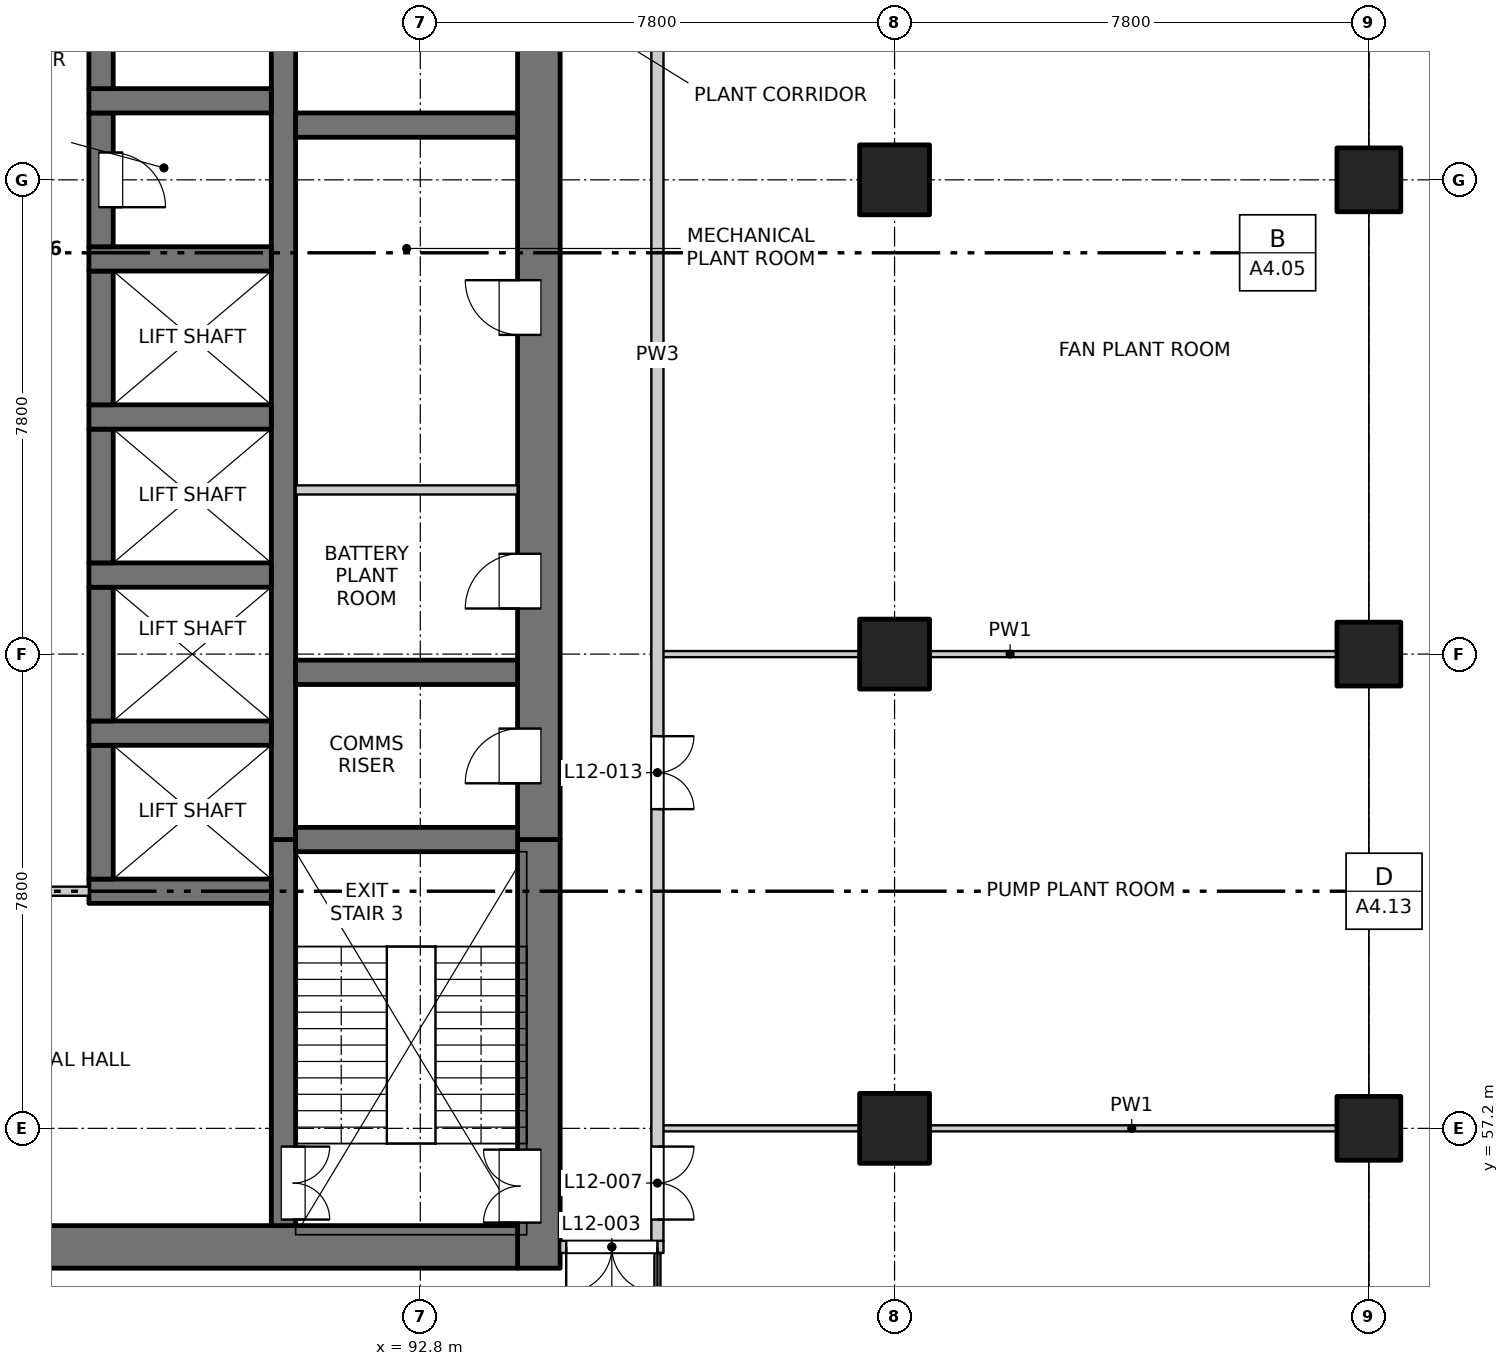
"""IFC4 building model, lengths in metres.
Left out: names, types, materials, properties, quantities, classifications, styles, units other than length and angle.
Written with IfcOpenShell. Run it as: python <this file> out.ifc"""

import sys

from ifc_helpers import new_model, si_unit, direction, frame, frame_2d, origin, origin_2d, place, context, subcontext, project, spatial, rectangle, extrude, element, fill, save


model = new_model("IFC4")
c1 = context("Model", 3, precision=1e-05, world=origin(), true_north=direction((0.0, 1.0)))
c2 = subcontext(c1, "Body", "Model", "MODEL_VIEW")
j1 = project(units=[si_unit("LENGTHUNIT", "METRE"), si_unit("PLANEANGLEUNIT", "RADIAN")], contexts=[c1])
p1 = place(None, origin())
s1 = spatial("IfcSite", under=j1, at=p1, CompositionType="ELEMENT")
p2 = place(p1, origin())
s2 = spatial("IfcBuilding", under=s1, at=p2, CompositionType="ELEMENT")
p3 = place(p2, frame((0.0, 0.0, 46.7)))
s3 = spatial("IfcBuildingStorey", under=s2, at=p3, CompositionType="ELEMENT", Elevation=46.7)
for number, where, z_axis, x_axis in (
    (1, (108.4, 57.2, -0.3), (0.0, 0.0, 1.0), (1.0, 0.0, 0.0)),
    (2, (108.4, 65.0, -0.3), (0.0, 0.0, 1.0), (1.0, 0.0, 0.0)),
    (3, (108.4, 72.8, -0.3), (0.0, 0.0, 1.0), (1.0, 0.0, 0.0)),
):
    element("IfcColumn", number, at=place(p3, frame(where, z_axis=z_axis, x_axis=x_axis)), inside=s3, PredefinedType="COLUMN", context=c2, shape_type="SweptSolid", body=[
        extrude(rectangle(XDim=1.05, YDim=1.05, at=origin_2d()), origin(), (0.0, 0.0, 1.0), 4.5),
    ])
for number, where, z_axis, x_axis in (
    (4, (100.6, 57.2, -0.3), (0.0, 0.0, 1.0), (1.0, 0.0, 0.0)),
    (5, (100.6, 65.0, -0.3), (0.0, 0.0, 1.0), (1.0, 0.0, 0.0)),
    (6, (100.6, 72.8, -0.3), (0.0, 0.0, 1.0), (1.0, 0.0, 0.0)),
):
    element("IfcColumn", number, at=place(p3, frame(where, z_axis=z_axis, x_axis=x_axis)), inside=s3, PredefinedType="COLUMN", context=c2, shape_type="SweptSolid", body=[
        extrude(rectangle(XDim=1.15, YDim=1.15, at=origin_2d()), origin(), (0.0, 0.0, 1.0), 4.5),
    ])
p4 = place(p3, frame((94.75, 54.9, -0.3), z_axis=(0.0, 0.0, 1.0), x_axis=(0.0, 1.0, 0.0)))
e7 = element("IfcWall", 7, at=p4, inside=s3, PredefinedType="SOLIDWALL", context=c2, shape_type="SweptSolid", body=[
    extrude(rectangle(XDim=7.05, YDim=0.7, at=frame_2d((3.525, 0.0))), origin(), (0.0, 0.0, 1.0), 4.5),
])
p5 = place(p4, frame((0.75, 0.0, 0.3)))
e8 = element("IfcOpeningElement", 8, at=p5, cuts=e7, PredefinedType="OPENING", context=c2, shape_type="SweptSolid", body=[
    extrude(rectangle(XDim=1.2, YDim=2.1, at=frame_2d((0.6, 1.05))), frame((0.0, 0.36, 0.0), z_axis=(0.0, -1.0, 0.0), x_axis=(1.0, 0.0, 0.0)), (0.0, 0.0, 1.0), 0.72),
])
p6 = place(p3, frame((94.75, 61.95, -0.3), z_axis=(0.0, 0.0, 1.0), x_axis=(0.0, 1.0, 0.0)))
e9 = element("IfcWall", 9, at=p6, inside=s3, PredefinedType="SOLIDWALL", context=c2, shape_type="SweptSolid", body=[
    extrude(rectangle(XDim=15.35, YDim=0.7, at=frame_2d((7.675, 0.0))), origin(), (0.0, 0.0, 1.0), 4.5),
])
p7 = place(p6, frame((0.925, 0.0, 0.3)))
e10 = element("IfcOpeningElement", 10, at=p7, cuts=e9, PredefinedType="OPENING", context=c2, shape_type="SweptSolid", body=[
    extrude(rectangle(XDim=0.9, YDim=2.1, at=frame_2d((0.45, 1.05))), frame((0.0, 0.36, 0.0), z_axis=(0.0, -1.0, 0.0), x_axis=(1.0, 0.0, 0.0)), (0.0, 0.0, 1.0), 0.72),
])
p8 = place(p6, frame((3.8, 0.0, 0.3)))
e11 = element("IfcOpeningElement", 11, at=p8, cuts=e9, PredefinedType="OPENING", context=c2, shape_type="SweptSolid", body=[
    extrude(rectangle(XDim=0.9, YDim=2.1, at=frame_2d((0.45, 1.05))), frame((0.0, 0.36, 0.0), z_axis=(0.0, -1.0, 0.0), x_axis=(1.0, 0.0, 0.0)), (0.0, 0.0, 1.0), 0.72),
])
p9 = place(p6, frame((8.3, 0.0, 0.3)))
e12 = element("IfcOpeningElement", 12, at=p9, cuts=e9, PredefinedType="OPENING", context=c2, shape_type="SweptSolid", body=[
    extrude(rectangle(XDim=0.9, YDim=2.1, at=frame_2d((0.45, 1.05))), frame((0.0, 0.36, 0.0), z_axis=(0.0, -1.0, 0.0), x_axis=(1.0, 0.0, 0.0)), (0.0, 0.0, 1.0), 0.72),
])
p10 = place(p6, frame((13.1, 0.0, 0.3)))
e13 = element("IfcOpeningElement", 13, at=p10, cuts=e9, PredefinedType="OPENING", context=c2, shape_type="SweptSolid", body=[
    extrude(rectangle(XDim=0.9, YDim=2.1, at=frame_2d((0.45, 1.05))), frame((0.0, 0.36, 0.0), z_axis=(0.0, -1.0, 0.0), x_axis=(1.0, 0.0, 0.0)), (0.0, 0.0, 1.0), 0.72),
])
p11 = place(p3, frame((75.6, 55.25, -0.3), z_axis=(0.0, 0.0, 1.0), x_axis=(1.0, 0.0, 0.0)))
e14 = element("IfcWall", 14, at=p11, inside=s3, PredefinedType="SOLIDWALL", context=c2, shape_type="SweptSolid", body=[
    extrude(rectangle(XDim=18.8, YDim=0.7, at=frame_2d((9.4, 0.0))), origin(), (0.0, 0.0, 1.0), 4.5),
])
p12 = place(p11, frame((7.15, 0.0, 0.3)))
e15 = element("IfcOpeningElement", 15, at=p12, cuts=e14, PredefinedType="OPENING", context=c2, shape_type="SweptSolid", body=[
    extrude(rectangle(XDim=1.5, YDim=2.1, at=frame_2d((0.75, 1.05))), frame((0.0, 0.36, 0.0), z_axis=(0.0, -1.0, 0.0), x_axis=(1.0, 0.0, 0.0)), (0.0, 0.0, 1.0), 0.72),
])
p13 = place(p3, frame((90.55, 55.6, -0.3), z_axis=(0.0, 0.0, 1.0), x_axis=(0.0, 1.0, 0.0)))
e16 = element("IfcWall", 16, at=p13, inside=s3, PredefinedType="SOLIDWALL", context=c2, shape_type="SweptSolid", body=[
    extrude(rectangle(XDim=6.35, YDim=0.4, at=frame_2d((3.175, 0.0))), origin(), (0.0, 0.0, 1.0), 4.5),
])
p14 = place(p13, frame((0.1, 0.0, 0.3)))
e17 = element("IfcOpeningElement", 17, at=p14, cuts=e16, PredefinedType="OPENING", context=c2, shape_type="SweptSolid", body=[
    extrude(rectangle(XDim=1.2, YDim=2.1, at=frame_2d((0.6, 1.05))), frame((0.0, 0.21, 0.0), z_axis=(0.0, -1.0, 0.0), x_axis=(1.0, 0.0, 0.0)), (0.0, 0.0, 1.0), 0.42),
])
p15 = place(p3, frame((90.55, 61.95, -0.3), z_axis=(0.0, 0.0, 1.0), x_axis=(0.0, 1.0, 0.0)))
e18 = element("IfcWall", 18, at=p15, inside=s3, PredefinedType="SOLIDWALL", context=c2, shape_type="SweptSolid", body=[
    extrude(rectangle(XDim=15.35, YDim=0.4, at=frame_2d((7.675, 0.0))), origin(), (0.0, 0.0, 1.0), 4.5),
])
p16 = place(p3, frame((87.35, 61.1, -0.3), z_axis=(0.0, 0.0, 1.0), x_axis=(1.0, 0.0, 0.0)))
e19 = element("IfcWall", 19, at=p16, inside=s3, PredefinedType="SOLIDWALL", context=c2, shape_type="SweptSolid", body=[
    extrude(rectangle(XDim=3.0, YDim=0.4, at=frame_2d((1.5, 0.0))), origin(), (0.0, 0.0, 1.0), 4.5),
])
p17 = place(p3, frame((87.55, 61.3, -0.3), z_axis=(0.0, 0.0, 1.0), x_axis=(0.0, 1.0, 0.0)))
e20 = element("IfcWall", 20, at=p17, inside=s3, PredefinedType="SOLIDWALL", context=c2, shape_type="SweptSolid", body=[
    extrude(rectangle(XDim=2.2, YDim=0.4, at=frame_2d((1.1, 0.0))), origin(), (0.0, 0.0, 1.0), 4.5),
])
p18 = place(p3, frame((87.35, 63.7, -0.3), z_axis=(0.0, 0.0, 1.0), x_axis=(1.0, 0.0, 0.0)))
e21 = element("IfcWall", 21, at=p18, inside=s3, PredefinedType="SOLIDWALL", context=c2, shape_type="SweptSolid", body=[
    extrude(rectangle(XDim=3.0, YDim=0.4, at=frame_2d((1.5, 0.0))), origin(), (0.0, 0.0, 1.0), 4.5),
])
p19 = place(p3, frame((87.55, 63.9, -0.3), z_axis=(0.0, 0.0, 1.0), x_axis=(0.0, 1.0, 0.0)))
e22 = element("IfcWall", 22, at=p19, inside=s3, PredefinedType="SOLIDWALL", context=c2, shape_type="SweptSolid", body=[
    extrude(rectangle(XDim=2.2, YDim=0.4, at=frame_2d((1.1, 0.0))), origin(), (0.0, 0.0, 1.0), 4.5),
])
p20 = place(p3, frame((87.35, 66.3, -0.3), z_axis=(0.0, 0.0, 1.0), x_axis=(1.0, 0.0, 0.0)))
e23 = element("IfcWall", 23, at=p20, inside=s3, PredefinedType="SOLIDWALL", context=c2, shape_type="SweptSolid", body=[
    extrude(rectangle(XDim=3.0, YDim=0.4, at=frame_2d((1.5, 0.0))), origin(), (0.0, 0.0, 1.0), 4.5),
])
p21 = place(p3, frame((87.55, 66.5, -0.3), z_axis=(0.0, 0.0, 1.0), x_axis=(0.0, 1.0, 0.0)))
e24 = element("IfcWall", 24, at=p21, inside=s3, PredefinedType="SOLIDWALL", context=c2, shape_type="SweptSolid", body=[
    extrude(rectangle(XDim=2.2, YDim=0.4, at=frame_2d((1.1, 0.0))), origin(), (0.0, 0.0, 1.0), 4.5),
])
p22 = place(p3, frame((87.35, 68.9, -0.3), z_axis=(0.0, 0.0, 1.0), x_axis=(1.0, 0.0, 0.0)))
e25 = element("IfcWall", 25, at=p22, inside=s3, PredefinedType="SOLIDWALL", context=c2, shape_type="SweptSolid", body=[
    extrude(rectangle(XDim=3.0, YDim=0.4, at=frame_2d((1.5, 0.0))), origin(), (0.0, 0.0, 1.0), 4.5),
])
p23 = place(p3, frame((87.55, 69.1, -0.3), z_axis=(0.0, 0.0, 1.0), x_axis=(0.0, 1.0, 0.0)))
e26 = element("IfcWall", 26, at=p23, inside=s3, PredefinedType="SOLIDWALL", context=c2, shape_type="SweptSolid", body=[
    extrude(rectangle(XDim=2.2, YDim=0.4, at=frame_2d((1.1, 0.0))), origin(), (0.0, 0.0, 1.0), 4.5),
])
p24 = place(p3, frame((87.35, 71.5, -0.3), z_axis=(0.0, 0.0, 1.0), x_axis=(1.0, 0.0, 0.0)))
e27 = element("IfcWall", 27, at=p24, inside=s3, PredefinedType="SOLIDWALL", context=c2, shape_type="SweptSolid", body=[
    extrude(rectangle(XDim=3.0, YDim=0.4, at=frame_2d((1.5, 0.0))), origin(), (0.0, 0.0, 1.0), 4.5),
])
p25 = place(p3, frame((87.55, 71.7, -0.3), z_axis=(0.0, 0.0, 1.0), x_axis=(0.0, 1.0, 0.0)))
e28 = element("IfcWall", 28, at=p25, inside=s3, PredefinedType="SOLIDWALL", context=c2, shape_type="SweptSolid", body=[
    extrude(rectangle(XDim=2.2, YDim=0.4, at=frame_2d((1.1, 0.0))), origin(), (0.0, 0.0, 1.0), 4.5),
])
p26 = place(p25, frame((0.65, 0.0, 0.3)))
e29 = element("IfcOpeningElement", 29, at=p26, cuts=e28, PredefinedType="OPENING", context=c2, shape_type="SweptSolid", body=[
    extrude(rectangle(XDim=0.9, YDim=2.1, at=frame_2d((0.45, 1.05))), frame((0.0, 0.21, 0.0), z_axis=(0.0, -1.0, 0.0), x_axis=(1.0, 0.0, 0.0)), (0.0, 0.0, 1.0), 0.42),
])
p27 = place(p3, frame((87.35, 74.1, -0.3), z_axis=(0.0, 0.0, 1.0), x_axis=(1.0, 0.0, 0.0)))
e30 = element("IfcWall", 30, at=p27, inside=s3, PredefinedType="SOLIDWALL", context=c2, shape_type="SweptSolid", body=[
    extrude(rectangle(XDim=3.0, YDim=0.4, at=frame_2d((1.5, 0.0))), origin(), (0.0, 0.0, 1.0), 4.5),
])
p28 = place(p3, frame((87.55, 74.3, -0.3), z_axis=(0.0, 0.0, 1.0), x_axis=(0.0, 1.0, 0.0)))
e31 = element("IfcWall", 31, at=p28, inside=s3, PredefinedType="SOLIDWALL", context=c2, shape_type="SweptSolid", body=[
    extrude(rectangle(XDim=2.2, YDim=0.4, at=frame_2d((1.1, 0.0))), origin(), (0.0, 0.0, 1.0), 4.5),
])
p29 = place(p28, frame((0.65, 0.0, 0.3)))
e32 = element("IfcOpeningElement", 32, at=p29, cuts=e31, PredefinedType="OPENING", context=c2, shape_type="SweptSolid", body=[
    extrude(rectangle(XDim=0.9, YDim=2.1, at=frame_2d((0.45, 1.05))), frame((0.0, 0.21, 0.0), z_axis=(0.0, -1.0, 0.0), x_axis=(1.0, 0.0, 0.0)), (0.0, 0.0, 1.0), 0.42),
])
for number, where, z_axis, x_axis in (
    (33, (90.75, 61.95, -0.3), (0.0, 0.0, 1.0), (1.0, 0.0, 0.0)),
    (34, (90.75, 64.7, -0.3), (0.0, 0.0, 1.0), (1.0, 0.0, 0.0)),
    (35, (90.75, 73.7, -0.3), (0.0, 0.0, 1.0), (1.0, 0.0, 0.0)),
):
    element("IfcWall", number, at=place(p3, frame(where, z_axis=z_axis, x_axis=x_axis)), inside=s3, PredefinedType="SOLIDWALL", context=c2, shape_type="SweptSolid", body=[
        extrude(rectangle(XDim=3.65, YDim=0.4, at=frame_2d((1.825, 0.0))), origin(), (0.0, 0.0, 1.0), 4.5),
    ])
p30 = place(p3, frame((95.1, 55.25, 0.0), z_axis=(0.0, 0.0, 1.0), x_axis=(1.0, 0.0, 0.0)))
e36 = element("IfcWall", 36, at=p30, inside=s3, PredefinedType="PARTITIONING", context=c2, shape_type="SweptSolid", body=[
    extrude(rectangle(XDim=1.7, YDim=0.2, at=frame_2d((0.85, 0.0))), origin(), (0.0, 0.0, 1.0), 4.2),
])
p31 = place(p30, frame((0.1, 0.0, 0.0)))
e37 = element("IfcOpeningElement", 37, at=p31, cuts=e36, PredefinedType="OPENING", context=c2, shape_type="SweptSolid", body=[
    extrude(rectangle(XDim=1.5, YDim=2.1, at=frame_2d((0.75, 1.05))), frame((0.0, 0.11, 0.0), z_axis=(0.0, -1.0, 0.0), x_axis=(1.0, 0.0, 0.0)), (0.0, 0.0, 1.0), 0.22),
])
p32 = place(p3, frame((96.6, 57.2, 0.0), z_axis=(0.0, 0.0, 1.0), x_axis=(1.0, 0.0, 0.0)))
e38 = element("IfcWall", 38, at=p32, inside=s3, PredefinedType="PARTITIONING", context=c2, shape_type="SweptSolid", body=[
    extrude(rectangle(XDim=4.0, YDim=0.1, at=frame_2d((2.0, 0.0))), origin(), (0.0, 0.0, 1.0), 4.2),
])
p33 = place(p3, frame((100.6, 57.2, 0.0), z_axis=(0.0, 0.0, 1.0), x_axis=(1.0, 0.0, 0.0)))
e39 = element("IfcWall", 39, at=p33, inside=s3, PredefinedType="PARTITIONING", context=c2, shape_type="SweptSolid", body=[
    extrude(rectangle(XDim=7.8, YDim=0.1, at=frame_2d((3.9, 0.0))), origin(), (0.0, 0.0, 1.0), 3.6),
])
p34 = place(p3, frame((82.65, 61.1, 0.0), z_axis=(0.0, 0.0, 1.0), x_axis=(1.0, 0.0, 0.0)))
e40 = element("IfcWall", 40, at=p34, inside=s3, PredefinedType="PARTITIONING", context=c2, shape_type="SweptSolid", body=[
    extrude(rectangle(XDim=4.7, YDim=0.15, at=frame_2d((2.35, 0.0))), origin(), (0.0, 0.0, 1.0), 4.2),
])
p35 = place(p34, frame((1.45, 0.0, 0.0)))
e41 = element("IfcOpeningElement", 41, at=p35, cuts=e40, PredefinedType="OPENING", context=c2, shape_type="SweptSolid", body=[
    extrude(rectangle(XDim=1.8, YDim=2.1, at=frame_2d((0.9, 1.05))), frame((0.0, 0.085, 0.0), z_axis=(0.0, -1.0, 0.0), x_axis=(1.0, 0.0, 0.0)), (0.0, 0.0, 1.0), 0.17),
])
p36 = place(p3, frame((96.6, 65.0, 0.0), z_axis=(0.0, 0.0, 1.0), x_axis=(1.0, 0.0, 0.0)))
e42 = element("IfcWall", 42, at=p36, inside=s3, PredefinedType="PARTITIONING", context=c2, shape_type="SweptSolid", body=[
    extrude(rectangle(XDim=11.8, YDim=0.1, at=frame_2d((5.9, 0.0))), origin(), (0.0, 0.0, 1.0), 4.2),
])
p37 = place(p3, frame((90.75, 67.7, 0.0), z_axis=(0.0, 0.0, 1.0), x_axis=(1.0, 0.0, 0.0)))
e43 = element("IfcWall", 43, at=p37, inside=s3, PredefinedType="PARTITIONING", context=c2, shape_type="SweptSolid", body=[
    extrude(rectangle(XDim=3.65, YDim=0.15, at=frame_2d((1.825, 0.0))), origin(), (0.0, 0.0, 1.0), 4.2),
])
p38 = place(p3, frame((96.7, 41.6, 0.0), z_axis=(0.0, 0.0, 1.0), x_axis=(0.0, 1.0, 0.0)))
e44 = element("IfcWall", 44, at=p38, inside=s3, PredefinedType="PARTITIONING", context=c2, shape_type="SweptSolid", body=[
    extrude(rectangle(XDim=13.55, YDim=0.1, at=frame_2d((6.775, 0.0))), origin(), (0.0, 0.0, 1.0), 4.2),
])
p39 = place(p3, frame((96.7, 55.35, 0.0), z_axis=(0.0, 0.0, 1.0), x_axis=(0.0, 1.0, 0.0)))
e45 = element("IfcWall", 45, at=p39, inside=s3, PredefinedType="PARTITIONING", context=c2, shape_type="SweptSolid", body=[
    extrude(rectangle(XDim=29.15, YDim=0.2, at=frame_2d((14.575, 0.0))), origin(), (0.0, 0.0, 1.0), 4.2),
])
p40 = place(p39, frame((0.35, 0.0, 0.0)))
e46 = element("IfcOpeningElement", 46, at=p40, cuts=e45, PredefinedType="OPENING", context=c2, shape_type="SweptSolid", body=[
    extrude(rectangle(XDim=1.2, YDim=2.1, at=frame_2d((0.6, 1.05))), frame((0.0, 0.11, 0.0), z_axis=(0.0, -1.0, 0.0), x_axis=(1.0, 0.0, 0.0)), (0.0, 0.0, 1.0), 0.22),
])
p41 = place(p39, frame((7.1, 0.0, 0.0)))
e47 = element("IfcOpeningElement", 47, at=p41, cuts=e45, PredefinedType="OPENING", context=c2, shape_type="SweptSolid", body=[
    extrude(rectangle(XDim=1.2, YDim=2.1, at=frame_2d((0.6, 1.05))), frame((0.0, 0.11, 0.0), z_axis=(0.0, -1.0, 0.0), x_axis=(1.0, 0.0, 0.0)), (0.0, 0.0, 1.0), 0.22),
])
p42 = place(p39, frame((22.7, 0.0, 0.0)))
e48 = element("IfcOpeningElement", 48, at=p42, cuts=e45, PredefinedType="OPENING", context=c2, shape_type="SweptSolid", body=[
    extrude(rectangle(XDim=1.2, YDim=2.1, at=frame_2d((0.6, 1.05))), frame((0.0, 0.11, 0.0), z_axis=(0.0, -1.0, 0.0), x_axis=(1.0, 0.0, 0.0)), (0.0, 0.0, 1.0), 0.22),
])
p43 = place(p39, frame((26.6, 0.0, 0.0)))
e49 = element("IfcOpeningElement", 49, at=p43, cuts=e45, PredefinedType="OPENING", context=c2, shape_type="SweptSolid", body=[
    extrude(rectangle(XDim=1.2, YDim=2.1, at=frame_2d((0.6, 1.05))), frame((0.0, 0.11, 0.0), z_axis=(0.0, -1.0, 0.0), x_axis=(1.0, 0.0, 0.0)), (0.0, 0.0, 1.0), 0.22),
])
p44 = place(p31, origin())
e50 = element("IfcDoor", 50, at=p44, inside=s3, OperationType="DOUBLE_DOOR_SINGLE_SWING", PredefinedType="DOOR", context=c2, shape_type="SweptSolid", body=[
    extrude(rectangle(XDim=1.5, YDim=2.1, at=frame_2d((0.75, 1.05))), frame((0.0, 0.025, 0.0), z_axis=(0.0, -1.0, 0.0), x_axis=(1.0, 0.0, 0.0)), (0.0, 0.0, 1.0), 0.05),
])
fill(e37, e50)
p45 = place(p14, origin())
e51 = element("IfcDoor", 51, at=p45, inside=s3, OperationType="DOUBLE_DOOR_SINGLE_SWING", PredefinedType="DOOR", context=c2, shape_type="SweptSolid", body=[
    extrude(rectangle(XDim=1.2, YDim=2.1, at=frame_2d((0.6, 1.05))), frame((0.0, -0.135, 0.0), z_axis=(0.0, -1.0, 0.0), x_axis=(1.0, 0.0, 0.0)), (0.0, 0.0, 1.0), 0.05),
])
fill(e17, e51)
p46 = place(p5, origin())
e52 = element("IfcDoor", 52, at=p46, inside=s3, OperationType="DOUBLE_DOOR_SINGLE_SWING", PredefinedType="DOOR", context=c2, shape_type="SweptSolid", body=[
    extrude(rectangle(XDim=1.2, YDim=2.1, at=frame_2d((0.6, 1.05))), frame((0.0, 0.335, 0.0), z_axis=(0.0, -1.0, 0.0), x_axis=(1.0, 0.0, 0.0)), (0.0, 0.0, 1.0), 0.05),
])
fill(e8, e52)
p47 = place(p40, origin())
e53 = element("IfcDoor", 53, at=p47, inside=s3, OperationType="DOUBLE_DOOR_SINGLE_SWING", PredefinedType="DOOR", context=c2, shape_type="SweptSolid", body=[
    extrude(rectangle(XDim=1.2, YDim=2.1, at=frame_2d((0.6, 1.05))), frame((0.0, 0.025, 0.0), z_axis=(0.0, -1.0, 0.0), x_axis=(1.0, 0.0, 0.0)), (0.0, 0.0, 1.0), 0.05),
])
fill(e46, e53)
p48 = place(p41, origin())
e54 = element("IfcDoor", 54, at=p48, inside=s3, OperationType="DOUBLE_DOOR_SINGLE_SWING", PredefinedType="DOOR", context=c2, shape_type="SweptSolid", body=[
    extrude(rectangle(XDim=1.2, YDim=2.1, at=frame_2d((0.6, 1.05))), frame((0.0, 0.025, 0.0), z_axis=(0.0, -1.0, 0.0), x_axis=(1.0, 0.0, 0.0)), (0.0, 0.0, 1.0), 0.05),
])
fill(e47, e54)
p49 = place(p7, origin())
e55 = element("IfcDoor", 55, at=p49, inside=s3, OperationType="SINGLE_SWING_LEFT", PredefinedType="DOOR", context=c2, shape_type="SweptSolid", body=[
    extrude(rectangle(XDim=0.9, YDim=2.1, at=frame_2d((0.45, 1.05))), frame((0.0, 0.335, 0.0), z_axis=(0.0, -1.0, 0.0), x_axis=(1.0, 0.0, 0.0)), (0.0, 0.0, 1.0), 0.05),
])
fill(e10, e55)
p50 = place(p8, origin())
e56 = element("IfcDoor", 56, at=p50, inside=s3, OperationType="SINGLE_SWING_LEFT", PredefinedType="DOOR", context=c2, shape_type="SweptSolid", body=[
    extrude(rectangle(XDim=0.9, YDim=2.1, at=frame_2d((0.45, 1.05))), frame((0.0, 0.335, 0.0), z_axis=(0.0, -1.0, 0.0), x_axis=(1.0, 0.0, 0.0)), (0.0, 0.0, 1.0), 0.05),
])
fill(e11, e56)
p51 = place(p9, origin())
e57 = element("IfcDoor", 57, at=p51, inside=s3, OperationType="SINGLE_SWING_RIGHT", PredefinedType="DOOR", context=c2, shape_type="SweptSolid", body=[
    extrude(rectangle(XDim=0.9, YDim=2.1, at=frame_2d((0.45, 1.05))), frame((0.0, 0.335, 0.0), z_axis=(0.0, -1.0, 0.0), x_axis=(1.0, 0.0, 0.0)), (0.0, 0.0, 1.0), 0.05),
])
fill(e12, e57)
p52 = place(p26, origin())
e58 = element("IfcDoor", 58, at=p52, inside=s3, OperationType="SINGLE_SWING_RIGHT", PredefinedType="DOOR", context=c2, shape_type="SweptSolid", body=[
    extrude(rectangle(XDim=0.9, YDim=2.1, at=frame_2d((0.45, 1.05))), frame((0.0, -0.135, 0.0), z_axis=(0.0, -1.0, 0.0), x_axis=(1.0, 0.0, 0.0)), (0.0, 0.0, 1.0), 0.05),
])
fill(e29, e58)
save(model, sys.argv[1])
